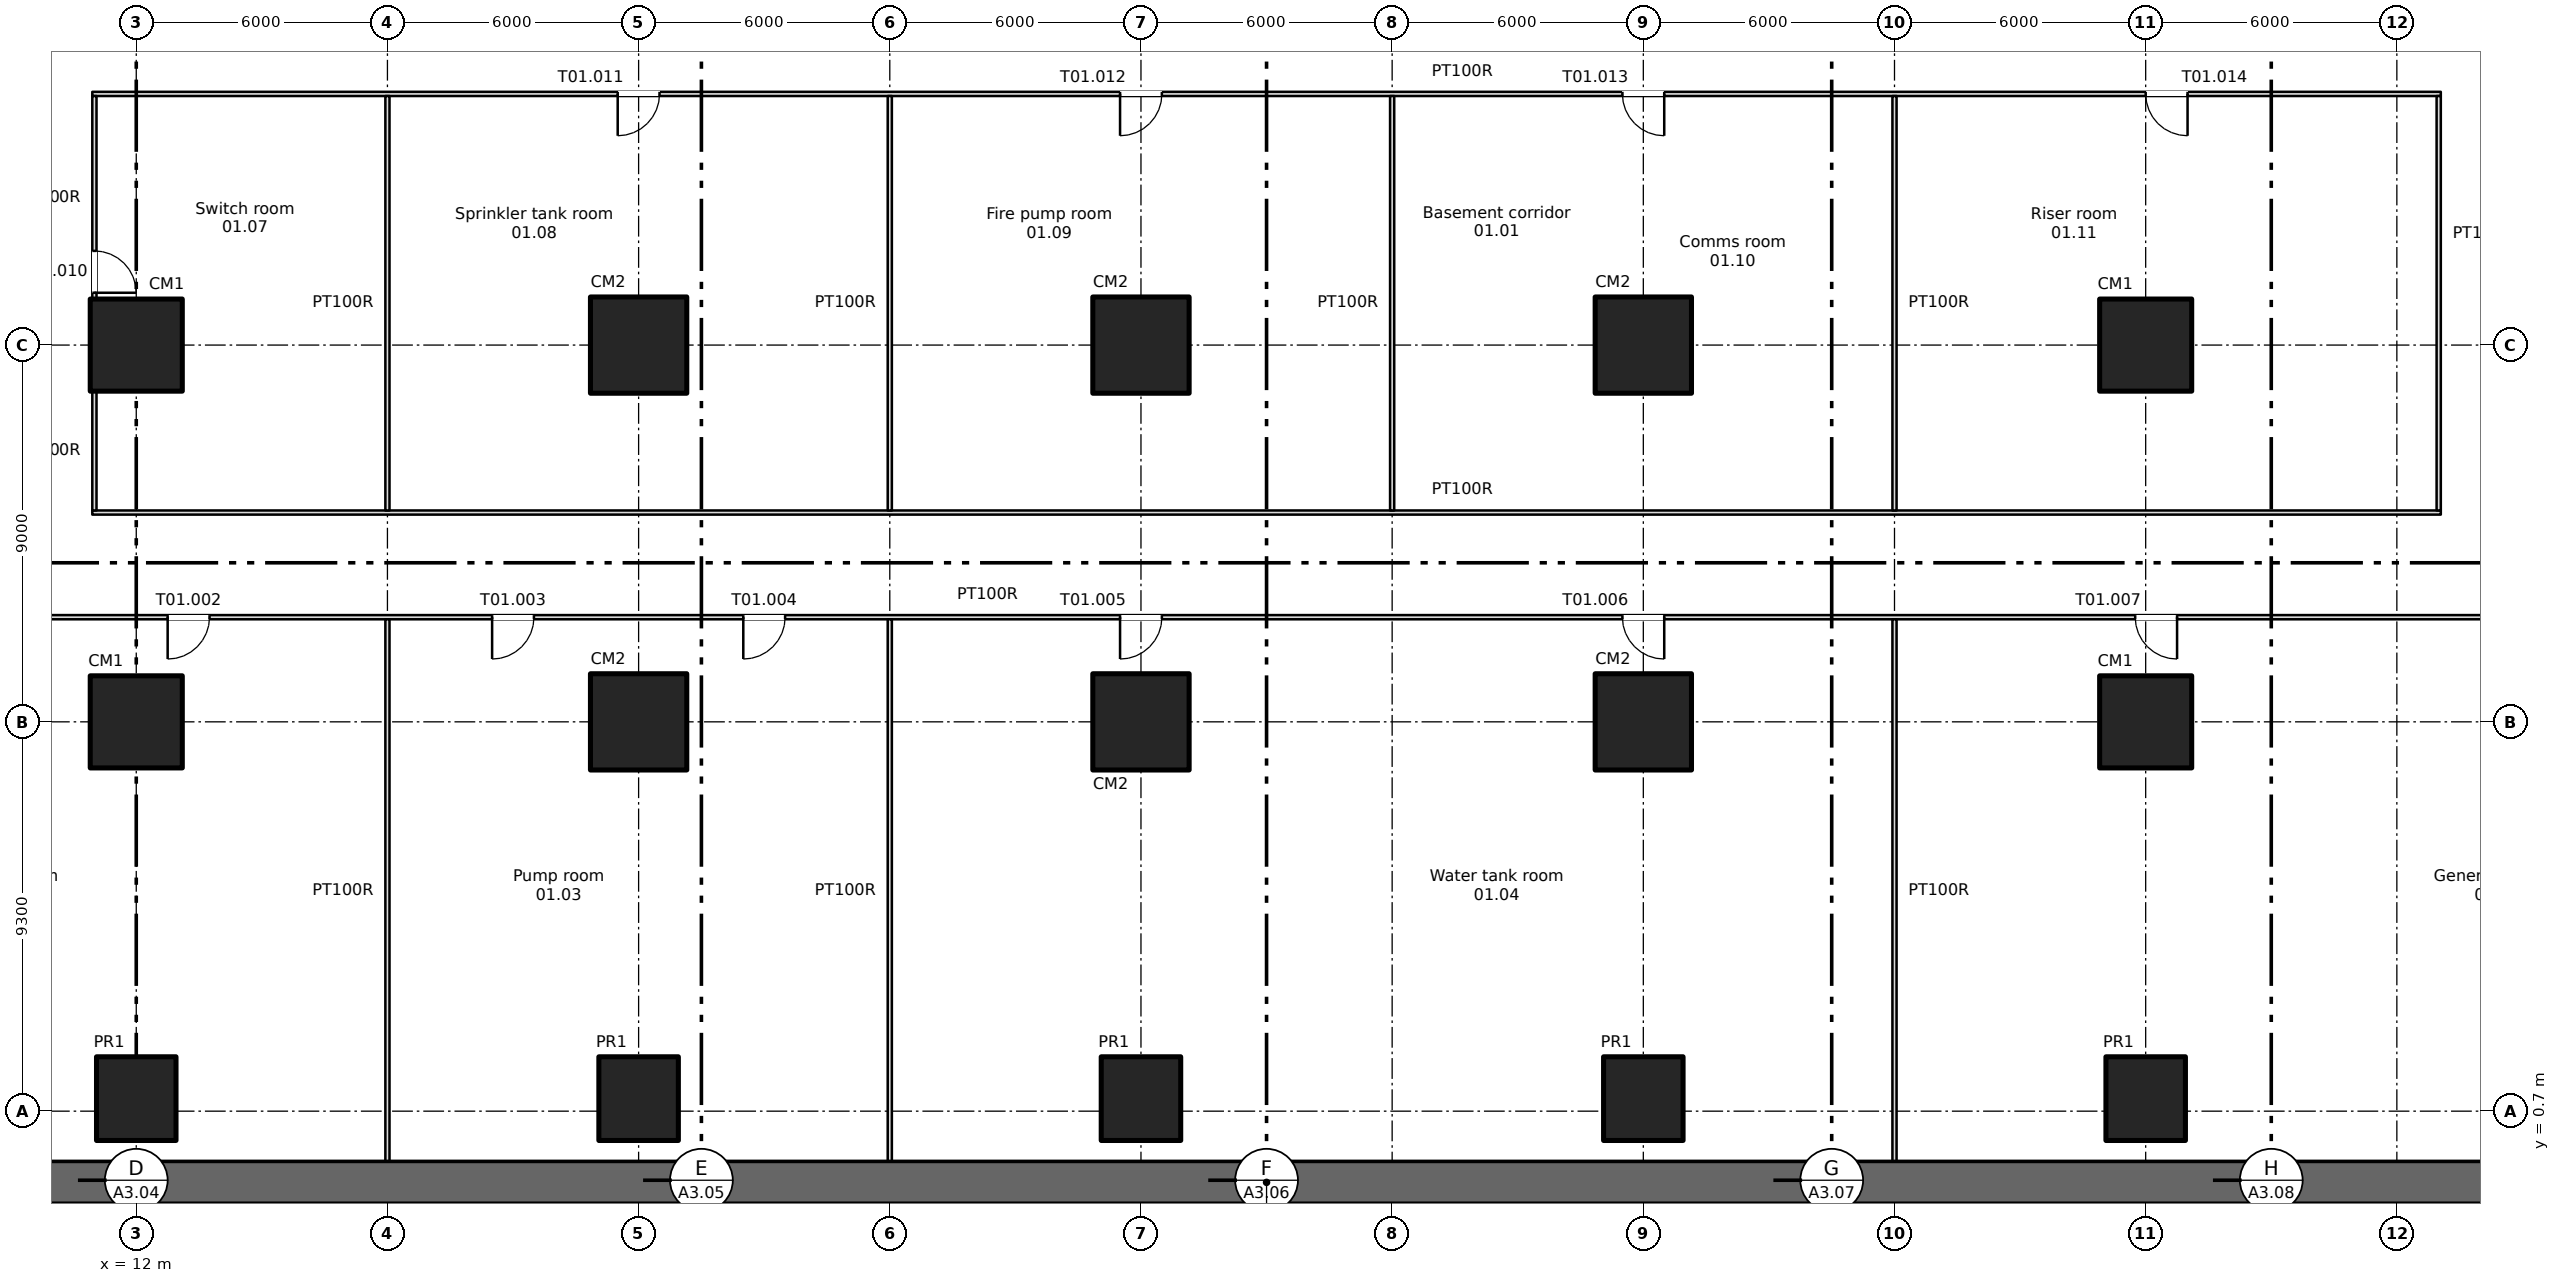
"""IFC4 building model, lengths in metres.
Left out: names, types, materials, properties, quantities, classifications, styles, units other than length and angle.
Written with IfcOpenShell. Run it as: python <this file> out.ifc"""

import sys

from ifc_helpers import new_model, si_unit, direction, frame, frame_2d, origin, origin_2d, place, context, subcontext, project, spatial, rectangle, extrude, element, fill, save


model = new_model("IFC4")
c1 = context("Model", 3, precision=1e-05, world=origin(), true_north=direction((0.0, 1.0)))
c2 = subcontext(c1, "Body", "Model", "MODEL_VIEW")
j1 = project(units=[si_unit("LENGTHUNIT", "METRE"), si_unit("PLANEANGLEUNIT", "RADIAN")], contexts=[c1])
p1 = place(None, origin())
s1 = spatial("IfcSite", under=j1, at=p1, CompositionType="ELEMENT")
p2 = place(p1, origin())
s2 = spatial("IfcBuilding", under=s1, at=p2, CompositionType="ELEMENT")
p3 = place(p2, frame((0.0, 0.0, -12.0)))
s3 = spatial("IfcBuildingStorey", under=s2, at=p3, CompositionType="ELEMENT", Elevation=-12.0)
p4 = place(p3, frame((-2.0, -1.0, 0.0), z_axis=(0.0, 0.0, 1.0), x_axis=(1.0, 0.0, 0.0)))
e1 = element("IfcWall", 1, at=p4, inside=s3, PredefinedType="SOLIDWALL", context=c2, shape_type="SweptSolid", body=[
    extrude(rectangle(XDim=82.0, YDim=1.0, at=frame_2d((41.0, 0.0))), origin(), (0.0, 0.0, 1.0), 5.55),
])
for number, where, z_axis, x_axis in (
    (2, (12.0, 1.0, 0.0), (0.0, 0.0, 1.0), (1.0, 0.0, 0.0)),
    (3, (24.0, 1.0, 0.0), (0.0, 0.0, 1.0), (1.0, 0.0, 0.0)),
    (4, (36.0, 1.0, 0.0), (0.0, 0.0, 1.0), (1.0, 0.0, 0.0)),
    (5, (48.0, 1.0, 0.0), (0.0, 0.0, 1.0), (1.0, 0.0, 0.0)),
    (6, (60.0, 1.0, 0.0), (0.0, 0.0, 1.0), (1.0, 0.0, 0.0)),
):
    element("IfcColumn", number, at=place(p3, frame(where, z_axis=z_axis, x_axis=x_axis)), inside=s3, PredefinedType="COLUMN", context=c2, shape_type="SweptSolid", body=[
        extrude(rectangle(XDim=1.9, YDim=2.0, at=origin_2d()), origin(), (0.0, 0.0, 1.0), 5.55),
    ])
for number, where, z_axis, x_axis in (
    (7, (12.0, 10.0, 0.0), (0.0, 0.0, 1.0), (1.0, 0.0, 0.0)),
    (8, (12.0, 19.0, 0.0), (0.0, 0.0, 1.0), (1.0, 0.0, 0.0)),
):
    element("IfcColumn", number, at=place(p3, frame(where, z_axis=z_axis, x_axis=x_axis)), inside=s3, PredefinedType="COLUMN", context=c2, shape_type="SweptSolid", body=[
        extrude(rectangle(XDim=2.2, YDim=2.2, at=origin_2d()), origin(), (0.0, 0.0, 1.0), 5.55),
    ])
for number, where, z_axis, x_axis in (
    (9, (24.0, 10.0, 0.0), (0.0, 0.0, 1.0), (1.0, 0.0, 0.0)),
    (10, (24.0, 19.0, 0.0), (0.0, 0.0, 1.0), (1.0, 0.0, 0.0)),
    (11, (36.0, 10.0, 0.0), (0.0, 0.0, 1.0), (1.0, 0.0, 0.0)),
    (12, (36.0, 19.0, 0.0), (0.0, 0.0, 1.0), (1.0, 0.0, 0.0)),
    (13, (48.0, 10.0, 0.0), (0.0, 0.0, 1.0), (1.0, 0.0, 0.0)),
    (14, (48.0, 19.0, 0.0), (0.0, 0.0, 1.0), (1.0, 0.0, 0.0)),
):
    element("IfcColumn", number, at=place(p3, frame(where, z_axis=z_axis, x_axis=x_axis)), inside=s3, PredefinedType="COLUMN", context=c2, shape_type="SweptSolid", body=[
        extrude(rectangle(XDim=2.3, YDim=2.3, at=origin_2d()), origin(), (0.0, 0.0, 1.0), 5.55),
    ])
for number, where, z_axis, x_axis in (
    (15, (60.0, 10.0, 0.0), (0.0, 0.0, 1.0), (1.0, 0.0, 0.0)),
    (16, (60.0, 19.0, 0.0), (0.0, 0.0, 1.0), (1.0, 0.0, 0.0)),
):
    element("IfcColumn", number, at=place(p3, frame(where, z_axis=z_axis, x_axis=x_axis)), inside=s3, PredefinedType="COLUMN", context=c2, shape_type="SweptSolid", body=[
        extrude(rectangle(XDim=2.2, YDim=2.2, at=origin_2d()), origin(), (0.0, 0.0, 1.0), 5.55),
    ])
p5 = place(p3, frame((-1.0, 12.5, 0.0), z_axis=(0.0, 0.0, 1.0), x_axis=(1.0, 0.0, 0.0)))
e17 = element("IfcWall", 17, at=p5, inside=s3, PredefinedType="PARTITIONING", context=c2, shape_type="SweptSolid", body=[
    extrude(rectangle(XDim=80.0, YDim=0.1, at=frame_2d((40.0, 0.0))), origin(), (0.0, 0.0, 1.0), 5.55),
])
p6 = place(p5, frame((4.25, 0.0, 0.0)))
e18 = element("IfcOpeningElement", 18, at=p6, cuts=e17, PredefinedType="OPENING", context=c2, shape_type="SweptSolid", body=[
    extrude(rectangle(XDim=1.0, YDim=2.1, at=frame_2d((0.5, 1.05))), frame((0.0, 0.06, 0.0), z_axis=(0.0, -1.0, 0.0), x_axis=(1.0, 0.0, 0.0)), (0.0, 0.0, 1.0), 0.12),
])
p7 = place(p5, frame((13.75, 0.0, 0.0)))
e19 = element("IfcOpeningElement", 19, at=p7, cuts=e17, PredefinedType="OPENING", context=c2, shape_type="SweptSolid", body=[
    extrude(rectangle(XDim=1.0, YDim=2.1, at=frame_2d((0.5, 1.05))), frame((0.0, 0.06, 0.0), z_axis=(0.0, -1.0, 0.0), x_axis=(1.0, 0.0, 0.0)), (0.0, 0.0, 1.0), 0.12),
])
p8 = place(p5, frame((21.5, 0.0, 0.0)))
e20 = element("IfcOpeningElement", 20, at=p8, cuts=e17, PredefinedType="OPENING", context=c2, shape_type="SweptSolid", body=[
    extrude(rectangle(XDim=1.0, YDim=2.1, at=frame_2d((0.5, 1.05))), frame((0.0, 0.06, 0.0), z_axis=(0.0, -1.0, 0.0), x_axis=(1.0, 0.0, 0.0)), (0.0, 0.0, 1.0), 0.12),
])
p9 = place(p5, frame((27.5, 0.0, 0.0)))
e21 = element("IfcOpeningElement", 21, at=p9, cuts=e17, PredefinedType="OPENING", context=c2, shape_type="SweptSolid", body=[
    extrude(rectangle(XDim=1.0, YDim=2.1, at=frame_2d((0.5, 1.05))), frame((0.0, 0.06, 0.0), z_axis=(0.0, -1.0, 0.0), x_axis=(1.0, 0.0, 0.0)), (0.0, 0.0, 1.0), 0.12),
])
p10 = place(p5, frame((36.5, 0.0, 0.0)))
e22 = element("IfcOpeningElement", 22, at=p10, cuts=e17, PredefinedType="OPENING", context=c2, shape_type="SweptSolid", body=[
    extrude(rectangle(XDim=1.0, YDim=2.1, at=frame_2d((0.5, 1.05))), frame((0.0, 0.06, 0.0), z_axis=(0.0, -1.0, 0.0), x_axis=(1.0, 0.0, 0.0)), (0.0, 0.0, 1.0), 0.12),
])
p11 = place(p5, frame((48.5, 0.0, 0.0)))
e23 = element("IfcOpeningElement", 23, at=p11, cuts=e17, PredefinedType="OPENING", context=c2, shape_type="SweptSolid", body=[
    extrude(rectangle(XDim=1.0, YDim=2.1, at=frame_2d((0.5, 1.05))), frame((0.0, 0.06, 0.0), z_axis=(0.0, -1.0, 0.0), x_axis=(1.0, 0.0, 0.0)), (0.0, 0.0, 1.0), 0.12),
])
p12 = place(p5, frame((60.75, 0.0, 0.0)))
e24 = element("IfcOpeningElement", 24, at=p12, cuts=e17, PredefinedType="OPENING", context=c2, shape_type="SweptSolid", body=[
    extrude(rectangle(XDim=1.0, YDim=2.1, at=frame_2d((0.5, 1.05))), frame((0.0, 0.06, 0.0), z_axis=(0.0, -1.0, 0.0), x_axis=(1.0, 0.0, 0.0)), (0.0, 0.0, 1.0), 0.12),
])
p13 = place(p5, frame((73.25, 0.0, 0.0)))
e25 = element("IfcOpeningElement", 25, at=p13, cuts=e17, PredefinedType="OPENING", context=c2, shape_type="SweptSolid", body=[
    extrude(rectangle(XDim=1.0, YDim=2.1, at=frame_2d((0.5, 1.05))), frame((0.0, 0.06, 0.0), z_axis=(0.0, -1.0, 0.0), x_axis=(1.0, 0.0, 0.0)), (0.0, 0.0, 1.0), 0.12),
])
p14 = place(p3, frame((10.95, 15.0, 0.0), z_axis=(0.0, 0.0, 1.0), x_axis=(1.0, 0.0, 0.0)))
e26 = element("IfcWall", 26, at=p14, inside=s3, PredefinedType="PARTITIONING", context=c2, shape_type="SweptSolid", body=[
    extrude(rectangle(XDim=56.1, YDim=0.1, at=frame_2d((28.05, 0.0))), origin(), (0.0, 0.0, 1.0), 5.55),
])
p15 = place(p3, frame((10.95, 25.0, 0.0), z_axis=(0.0, 0.0, 1.0), x_axis=(1.0, 0.0, 0.0)))
e27 = element("IfcWall", 27, at=p15, inside=s3, PredefinedType="PARTITIONING", context=c2, shape_type="SweptSolid", body=[
    extrude(rectangle(XDim=56.1, YDim=0.1, at=frame_2d((28.05, 0.0))), origin(), (0.0, 0.0, 1.0), 5.55),
])
p16 = place(p15, frame((12.55, 0.0, 0.0)))
e28 = element("IfcOpeningElement", 28, at=p16, cuts=e27, PredefinedType="OPENING", context=c2, shape_type="SweptSolid", body=[
    extrude(rectangle(XDim=1.0, YDim=2.1, at=frame_2d((0.5, 1.05))), frame((0.0, 0.06, 0.0), z_axis=(0.0, -1.0, 0.0), x_axis=(1.0, 0.0, 0.0)), (0.0, 0.0, 1.0), 0.12),
])
p17 = place(p15, frame((24.55, 0.0, 0.0)))
e29 = element("IfcOpeningElement", 29, at=p17, cuts=e27, PredefinedType="OPENING", context=c2, shape_type="SweptSolid", body=[
    extrude(rectangle(XDim=1.0, YDim=2.1, at=frame_2d((0.5, 1.05))), frame((0.0, 0.06, 0.0), z_axis=(0.0, -1.0, 0.0), x_axis=(1.0, 0.0, 0.0)), (0.0, 0.0, 1.0), 0.12),
])
p18 = place(p15, frame((36.55, 0.0, 0.0)))
e30 = element("IfcOpeningElement", 30, at=p18, cuts=e27, PredefinedType="OPENING", context=c2, shape_type="SweptSolid", body=[
    extrude(rectangle(XDim=1.0, YDim=2.1, at=frame_2d((0.5, 1.05))), frame((0.0, 0.06, 0.0), z_axis=(0.0, -1.0, 0.0), x_axis=(1.0, 0.0, 0.0)), (0.0, 0.0, 1.0), 0.12),
])
p19 = place(p15, frame((49.05, 0.0, 0.0)))
e31 = element("IfcOpeningElement", 31, at=p19, cuts=e27, PredefinedType="OPENING", context=c2, shape_type="SweptSolid", body=[
    extrude(rectangle(XDim=1.0, YDim=2.1, at=frame_2d((0.5, 1.05))), frame((0.0, 0.06, 0.0), z_axis=(0.0, -1.0, 0.0), x_axis=(1.0, 0.0, 0.0)), (0.0, 0.0, 1.0), 0.12),
])
p20 = place(p3, frame((11.0, 15.05, 0.0), z_axis=(0.0, 0.0, 1.0), x_axis=(0.0, 1.0, 0.0)))
e32 = element("IfcWall", 32, at=p20, inside=s3, PredefinedType="PARTITIONING", context=c2, shape_type="SweptSolid", body=[
    extrude(rectangle(XDim=2.85, YDim=0.1, at=frame_2d((1.425, 0.0))), origin(), (0.0, 0.0, 1.0), 5.55),
])
p21 = place(p3, frame((11.0, 20.1, 0.0), z_axis=(0.0, 0.0, 1.0), x_axis=(0.0, 1.0, 0.0)))
e33 = element("IfcWall", 33, at=p21, inside=s3, PredefinedType="PARTITIONING", context=c2, shape_type="SweptSolid", body=[
    extrude(rectangle(XDim=4.85, YDim=0.1, at=frame_2d((2.425, 0.0))), origin(), (0.0, 0.0, 1.0), 5.55),
])
p22 = place(p21, frame((0.15, 0.0, 0.0)))
e34 = element("IfcOpeningElement", 34, at=p22, cuts=e33, PredefinedType="OPENING", context=c2, shape_type="SweptSolid", body=[
    extrude(rectangle(XDim=1.0, YDim=2.1, at=frame_2d((0.5, 1.05))), frame((0.0, 0.06, 0.0), z_axis=(0.0, -1.0, 0.0), x_axis=(1.0, 0.0, 0.0)), (0.0, 0.0, 1.0), 0.12),
])
p23 = place(p3, frame((18.0, -0.5, 0.0), z_axis=(0.0, 0.0, 1.0), x_axis=(0.0, 1.0, 0.0)))
e35 = element("IfcWall", 35, at=p23, inside=s3, PredefinedType="PARTITIONING", context=c2, shape_type="SweptSolid", body=[
    extrude(rectangle(XDim=12.95, YDim=0.1, at=frame_2d((6.475, 0.0))), origin(), (0.0, 0.0, 1.0), 5.55),
])
p24 = place(p3, frame((18.0, 15.05, 0.0), z_axis=(0.0, 0.0, 1.0), x_axis=(0.0, 1.0, 0.0)))
e36 = element("IfcWall", 36, at=p24, inside=s3, PredefinedType="PARTITIONING", context=c2, shape_type="SweptSolid", body=[
    extrude(rectangle(XDim=9.9, YDim=0.1, at=frame_2d((4.95, 0.0))), origin(), (0.0, 0.0, 1.0), 5.55),
])
p25 = place(p3, frame((30.0, -0.5, 0.0), z_axis=(0.0, 0.0, 1.0), x_axis=(0.0, 1.0, 0.0)))
e37 = element("IfcWall", 37, at=p25, inside=s3, PredefinedType="PARTITIONING", context=c2, shape_type="SweptSolid", body=[
    extrude(rectangle(XDim=12.95, YDim=0.1, at=frame_2d((6.475, 0.0))), origin(), (0.0, 0.0, 1.0), 5.55),
])
for number, where, z_axis, x_axis in (
    (38, (30.0, 15.05, 0.0), (0.0, 0.0, 1.0), (0.0, 1.0, 0.0)),
    (39, (42.0, 15.05, 0.0), (0.0, 0.0, 1.0), (0.0, 1.0, 0.0)),
):
    element("IfcWall", number, at=place(p3, frame(where, z_axis=z_axis, x_axis=x_axis)), inside=s3, PredefinedType="PARTITIONING", context=c2, shape_type="SweptSolid", body=[
        extrude(rectangle(XDim=9.9, YDim=0.1, at=frame_2d((4.95, 0.0))), origin(), (0.0, 0.0, 1.0), 5.55),
    ])
p26 = place(p3, frame((54.0, -0.5, 0.0), z_axis=(0.0, 0.0, 1.0), x_axis=(0.0, 1.0, 0.0)))
e40 = element("IfcWall", 40, at=p26, inside=s3, PredefinedType="PARTITIONING", context=c2, shape_type="SweptSolid", body=[
    extrude(rectangle(XDim=12.95, YDim=0.1, at=frame_2d((6.475, 0.0))), origin(), (0.0, 0.0, 1.0), 5.55),
])
for number, where, z_axis, x_axis in (
    (41, (54.0, 15.05, 0.0), (0.0, 0.0, 1.0), (0.0, 1.0, 0.0)),
    (42, (67.0, 15.05, 0.0), (0.0, 0.0, 1.0), (0.0, 1.0, 0.0)),
):
    element("IfcWall", number, at=place(p3, frame(where, z_axis=z_axis, x_axis=x_axis)), inside=s3, PredefinedType="PARTITIONING", context=c2, shape_type="SweptSolid", body=[
        extrude(rectangle(XDim=9.9, YDim=0.1, at=frame_2d((4.95, 0.0))), origin(), (0.0, 0.0, 1.0), 5.55),
    ])
p27 = place(p7, origin())
e43 = element("IfcDoor", 43, at=p27, inside=s3, OperationType="SINGLE_SWING_LEFT", PredefinedType="DOOR", context=c2, shape_type="SweptSolid", body=[
    extrude(rectangle(XDim=1.0, YDim=2.1, at=frame_2d((0.5, 1.05))), frame((0.0, 0.025, 0.0), z_axis=(0.0, -1.0, 0.0), x_axis=(1.0, 0.0, 0.0)), (0.0, 0.0, 1.0), 0.05),
])
fill(e19, e43)
p28 = place(p8, origin())
e44 = element("IfcDoor", 44, at=p28, inside=s3, OperationType="SINGLE_SWING_LEFT", PredefinedType="DOOR", context=c2, shape_type="SweptSolid", body=[
    extrude(rectangle(XDim=1.0, YDim=2.1, at=frame_2d((0.5, 1.05))), frame((0.0, 0.025, 0.0), z_axis=(0.0, -1.0, 0.0), x_axis=(1.0, 0.0, 0.0)), (0.0, 0.0, 1.0), 0.05),
])
fill(e20, e44)
p29 = place(p9, origin())
e45 = element("IfcDoor", 45, at=p29, inside=s3, OperationType="SINGLE_SWING_LEFT", PredefinedType="DOOR", context=c2, shape_type="SweptSolid", body=[
    extrude(rectangle(XDim=1.0, YDim=2.1, at=frame_2d((0.5, 1.05))), frame((0.0, 0.025, 0.0), z_axis=(0.0, -1.0, 0.0), x_axis=(1.0, 0.0, 0.0)), (0.0, 0.0, 1.0), 0.05),
])
fill(e21, e45)
p30 = place(p10, origin())
e46 = element("IfcDoor", 46, at=p30, inside=s3, OperationType="SINGLE_SWING_LEFT", PredefinedType="DOOR", context=c2, shape_type="SweptSolid", body=[
    extrude(rectangle(XDim=1.0, YDim=2.1, at=frame_2d((0.5, 1.05))), frame((0.0, 0.025, 0.0), z_axis=(0.0, -1.0, 0.0), x_axis=(1.0, 0.0, 0.0)), (0.0, 0.0, 1.0), 0.05),
])
fill(e22, e46)
p31 = place(p11, origin())
e47 = element("IfcDoor", 47, at=p31, inside=s3, OperationType="SINGLE_SWING_RIGHT", PredefinedType="DOOR", context=c2, shape_type="SweptSolid", body=[
    extrude(rectangle(XDim=1.0, YDim=2.1, at=frame_2d((0.5, 1.05))), frame((0.0, 0.025, 0.0), z_axis=(0.0, -1.0, 0.0), x_axis=(1.0, 0.0, 0.0)), (0.0, 0.0, 1.0), 0.05),
])
fill(e23, e47)
p32 = place(p12, origin())
e48 = element("IfcDoor", 48, at=p32, inside=s3, OperationType="SINGLE_SWING_RIGHT", PredefinedType="DOOR", context=c2, shape_type="SweptSolid", body=[
    extrude(rectangle(XDim=1.0, YDim=2.1, at=frame_2d((0.5, 1.05))), frame((0.0, 0.025, 0.0), z_axis=(0.0, -1.0, 0.0), x_axis=(1.0, 0.0, 0.0)), (0.0, 0.0, 1.0), 0.05),
])
fill(e24, e48)
p33 = place(p22, origin())
e49 = element("IfcDoor", 49, at=p33, inside=s3, OperationType="SINGLE_SWING_LEFT", PredefinedType="DOOR", context=c2, shape_type="SweptSolid", body=[
    extrude(rectangle(XDim=1.0, YDim=2.1, at=frame_2d((0.5, 1.05))), frame((0.0, 0.025, 0.0), z_axis=(0.0, -1.0, 0.0), x_axis=(1.0, 0.0, 0.0)), (0.0, 0.0, 1.0), 0.05),
])
fill(e34, e49)
p34 = place(p16, origin())
e50 = element("IfcDoor", 50, at=p34, inside=s3, OperationType="SINGLE_SWING_LEFT", PredefinedType="DOOR", context=c2, shape_type="SweptSolid", body=[
    extrude(rectangle(XDim=1.0, YDim=2.1, at=frame_2d((0.5, 1.05))), frame((0.0, 0.025, 0.0), z_axis=(0.0, -1.0, 0.0), x_axis=(1.0, 0.0, 0.0)), (0.0, 0.0, 1.0), 0.05),
])
fill(e28, e50)
p35 = place(p17, origin())
e51 = element("IfcDoor", 51, at=p35, inside=s3, OperationType="SINGLE_SWING_LEFT", PredefinedType="DOOR", context=c2, shape_type="SweptSolid", body=[
    extrude(rectangle(XDim=1.0, YDim=2.1, at=frame_2d((0.5, 1.05))), frame((0.0, 0.025, 0.0), z_axis=(0.0, -1.0, 0.0), x_axis=(1.0, 0.0, 0.0)), (0.0, 0.0, 1.0), 0.05),
])
fill(e29, e51)
p36 = place(p18, origin())
e52 = element("IfcDoor", 52, at=p36, inside=s3, OperationType="SINGLE_SWING_RIGHT", PredefinedType="DOOR", context=c2, shape_type="SweptSolid", body=[
    extrude(rectangle(XDim=1.0, YDim=2.1, at=frame_2d((0.5, 1.05))), frame((0.0, 0.025, 0.0), z_axis=(0.0, -1.0, 0.0), x_axis=(1.0, 0.0, 0.0)), (0.0, 0.0, 1.0), 0.05),
])
fill(e30, e52)
p37 = place(p19, origin())
e53 = element("IfcDoor", 53, at=p37, inside=s3, OperationType="SINGLE_SWING_RIGHT", PredefinedType="DOOR", context=c2, shape_type="SweptSolid", body=[
    extrude(rectangle(XDim=1.0, YDim=2.1, at=frame_2d((0.5, 1.05))), frame((0.0, 0.025, 0.0), z_axis=(0.0, -1.0, 0.0), x_axis=(1.0, 0.0, 0.0)), (0.0, 0.0, 1.0), 0.05),
])
fill(e31, e53)
save(model, sys.argv[1])
